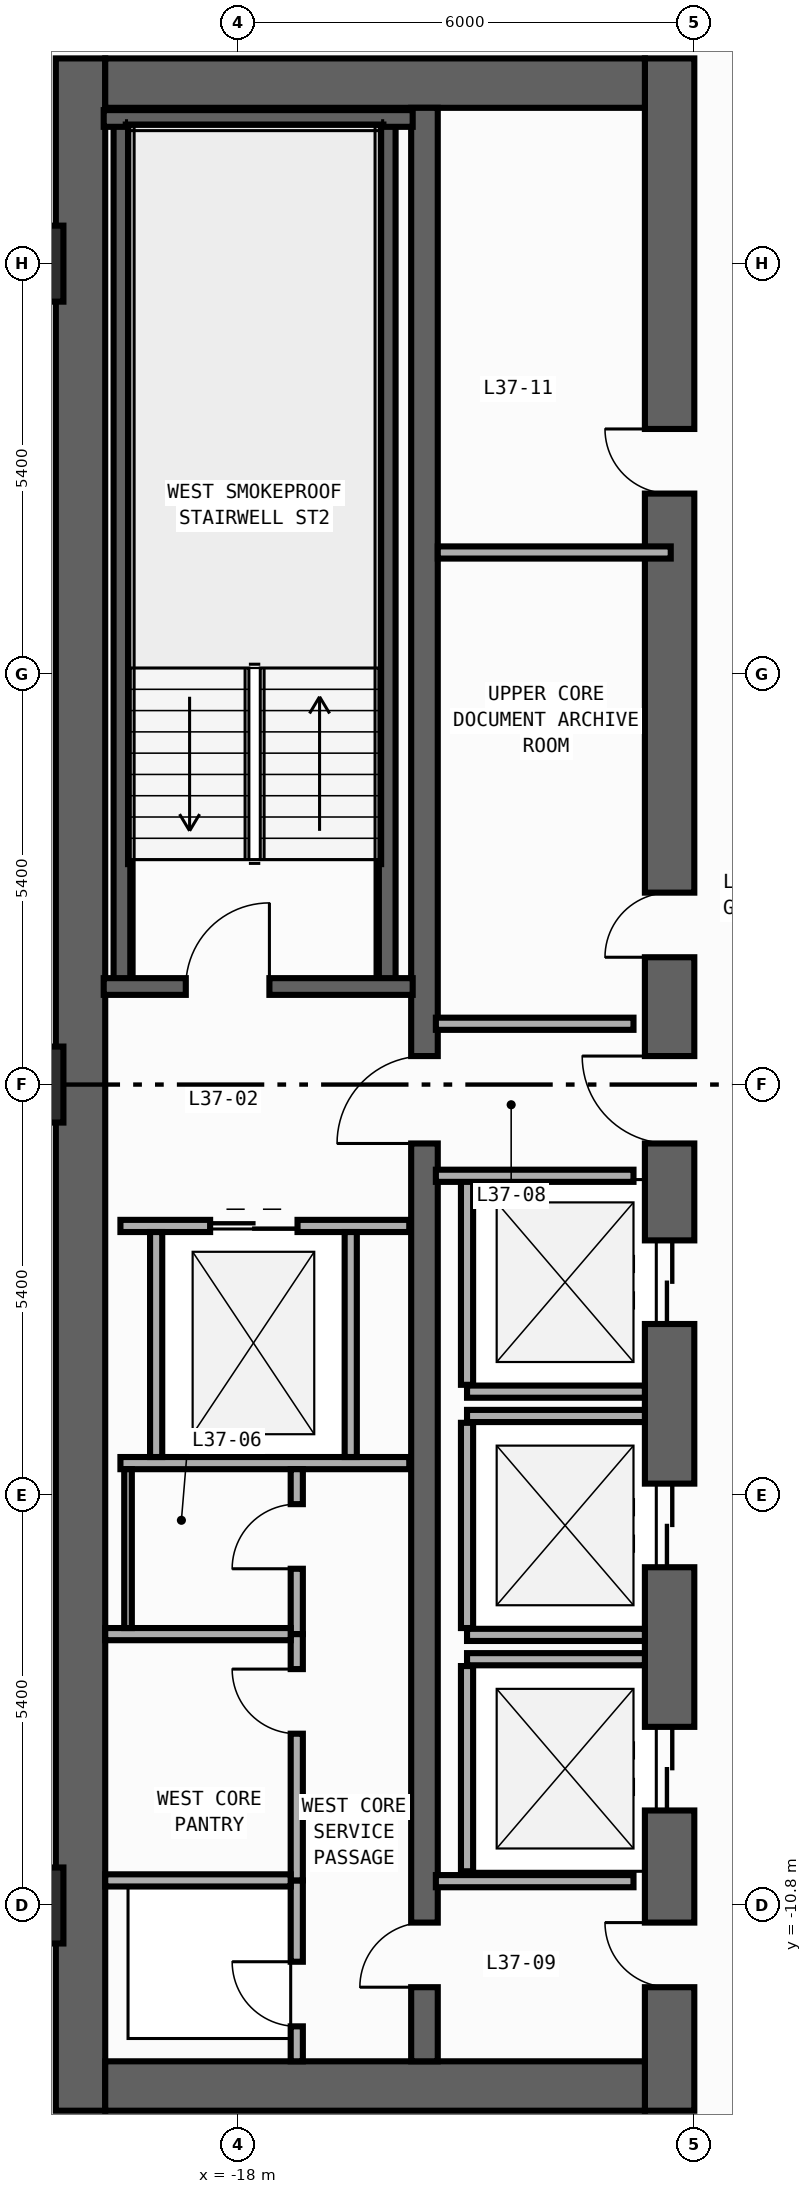
"""IFC4 building model, lengths in metres.
Left out: names, types, materials, properties, quantities, classifications, styles, units other than length and angle.
Written with IfcOpenShell. Run it as: python <this file> out.ifc"""

import sys

from ifc_helpers import new_model, si_unit, direction, frame, frame_2d, origin, origin_2d, place, context, subcontext, project, spatial, rectangle, extrude, element, fill, save


model = new_model("IFC4")
c1 = context("Model", 3, precision=1e-05, world=origin(), true_north=direction((0.0, 1.0)))
c2 = subcontext(c1, "Body", "Model", "MODEL_VIEW")
j1 = project(units=[si_unit("LENGTHUNIT", "METRE"), si_unit("PLANEANGLEUNIT", "RADIAN")], contexts=[c1])
p1 = place(None, origin())
s1 = spatial("IfcSite", under=j1, at=p1, CompositionType="ELEMENT")
p2 = place(p1, origin())
s2 = spatial("IfcBuilding", under=s1, at=p2, CompositionType="ELEMENT")
p3 = place(p2, frame((0.0, 0.0, 165.0)))
s3 = spatial("IfcBuildingStorey", under=s2, at=p3, CompositionType="ELEMENT", Elevation=165.0)
p4 = place(p3, frame((-20.075, -13.5, 0.0), z_axis=(0.0, 0.0, 1.0), x_axis=(0.0, 1.0, 0.0)))
e1 = element("IfcWall", 1, at=p4, inside=s3, PredefinedType="SHEAR", context=c2, shape_type="SweptSolid", body=[
    extrude(rectangle(XDim=27.0, YDim=0.65, at=frame_2d((13.5, 0.0))), origin(), (0.0, 0.0, 1.0), 3.54),
])
p5 = place(p3, frame((-12.325, -13.5, 0.0), z_axis=(0.0, 0.0, 1.0), x_axis=(0.0, 1.0, 0.0)))
e2 = element("IfcWall", 2, at=p5, inside=s3, PredefinedType="SHEAR", context=c2, shape_type="SweptSolid", body=[
    extrude(rectangle(XDim=27.0, YDim=0.65, at=frame_2d((13.5, 0.0))), origin(), (0.0, 0.0, 1.0), 3.54),
])
p6 = place(p5, frame((10.35, 0.0, 0.0)))
e3 = element("IfcOpeningElement", 3, at=p6, cuts=e2, PredefinedType="OPENING", context=c2, shape_type="SweptSolid", body=[
    extrude(rectangle(XDim=1.1, YDim=2.2, at=frame_2d((0.55, 1.1))), frame((0.0, 0.335, 0.0), z_axis=(0.0, -1.0, 0.0), x_axis=(1.0, 0.0, 0.0)), (0.0, 0.0, 1.0), 0.67),
])
p7 = place(p5, frame((7.15, 0.0, 0.0)))
e4 = element("IfcOpeningElement", 4, at=p7, cuts=e2, PredefinedType="OPENING", context=c2, shape_type="SweptSolid", body=[
    extrude(rectangle(XDim=1.1, YDim=2.2, at=frame_2d((0.55, 1.1))), frame((0.0, 0.335, 0.0), z_axis=(0.0, -1.0, 0.0), x_axis=(1.0, 0.0, 0.0)), (0.0, 0.0, 1.0), 0.67),
])
p8 = place(p5, frame((3.95, 0.0, 0.0)))
e5 = element("IfcOpeningElement", 5, at=p8, cuts=e2, PredefinedType="OPENING", context=c2, shape_type="SweptSolid", body=[
    extrude(rectangle(XDim=1.1, YDim=2.2, at=frame_2d((0.55, 1.1))), frame((0.0, 0.335, 0.0), z_axis=(0.0, -1.0, 0.0), x_axis=(1.0, 0.0, 0.0)), (0.0, 0.0, 1.0), 0.67),
])
p9 = place(p5, frame((15.175, 0.0, 0.0)))
e6 = element("IfcOpeningElement", 6, at=p9, cuts=e2, PredefinedType="OPENING", context=c2, shape_type="SweptSolid", body=[
    extrude(rectangle(XDim=0.85, YDim=2.1, at=frame_2d((0.425, 1.05))), frame((0.0, 0.335, 0.0), z_axis=(0.0, -1.0, 0.0), x_axis=(1.0, 0.0, 0.0)), (0.0, 0.0, 1.0), 0.67),
])
p10 = place(p5, frame((21.275, 0.0, 0.0)))
e7 = element("IfcOpeningElement", 7, at=p10, cuts=e2, PredefinedType="OPENING", context=c2, shape_type="SweptSolid", body=[
    extrude(rectangle(XDim=0.85, YDim=2.1, at=frame_2d((0.425, 1.05))), frame((0.0, 0.335, 0.0), z_axis=(0.0, -1.0, 0.0), x_axis=(1.0, 0.0, 0.0)), (0.0, 0.0, 1.0), 0.67),
])
p11 = place(p5, frame((12.725, 0.0, 0.0)))
e8 = element("IfcOpeningElement", 8, at=p11, cuts=e2, PredefinedType="OPENING", context=c2, shape_type="SweptSolid", body=[
    extrude(rectangle(XDim=1.15, YDim=2.2, at=frame_2d((0.575, 1.1))), frame((0.0, 0.335, 0.0), z_axis=(0.0, -1.0, 0.0), x_axis=(1.0, 0.0, 0.0)), (0.0, 0.0, 1.0), 0.67),
])
p12 = place(p5, frame((1.625, 0.0, 0.0)))
e9 = element("IfcOpeningElement", 9, at=p12, cuts=e2, PredefinedType="OPENING", context=c2, shape_type="SweptSolid", body=[
    extrude(rectangle(XDim=0.85, YDim=2.1, at=frame_2d((0.425, 1.05))), frame((0.0, 0.335, 0.0), z_axis=(0.0, -1.0, 0.0), x_axis=(1.0, 0.0, 0.0)), (0.0, 0.0, 1.0), 0.67),
])
for number, where, z_axis, x_axis in (
    (10, (-19.75, -13.175, 0.0), (0.0, 0.0, 1.0), (1.0, 0.0, 0.0)),
    (11, (-19.75, 13.175, 0.0), (0.0, 0.0, 1.0), (1.0, 0.0, 0.0)),
):
    element("IfcWall", number, at=place(p3, frame(where, z_axis=z_axis, x_axis=x_axis)), inside=s3, PredefinedType="SHEAR", context=c2, shape_type="SweptSolid", body=[
        extrude(rectangle(XDim=7.1, YDim=0.65, at=frame_2d((3.55, 0.0))), origin(), (0.0, 0.0, 1.0), 3.54),
    ])
p13 = place(p3, frame((-15.55, -12.85, 0.0), z_axis=(0.0, 0.0, 1.0), x_axis=(0.0, 1.0, 0.0)))
e12 = element("IfcWall", 12, at=p13, inside=s3, PredefinedType="SHEAR", context=c2, shape_type="SweptSolid", body=[
    extrude(rectangle(XDim=25.7, YDim=0.35, at=frame_2d((12.85, 0.0))), origin(), (0.0, 0.0, 1.0), 3.54),
])
p14 = place(p13, frame((12.075, 0.0, 0.0)))
e13 = element("IfcOpeningElement", 13, at=p14, cuts=e12, PredefinedType="OPENING", context=c2, shape_type="SweptSolid", body=[
    extrude(rectangle(XDim=1.15, YDim=2.2, at=frame_2d((0.575, 1.1))), frame((0.0, 0.185, 0.0), z_axis=(0.0, -1.0, 0.0), x_axis=(1.0, 0.0, 0.0)), (0.0, 0.0, 1.0), 0.37),
])
p15 = place(p13, frame((0.975, 0.0, 0.0)))
e14 = element("IfcOpeningElement", 14, at=p15, cuts=e12, PredefinedType="OPENING", context=c2, shape_type="SweptSolid", body=[
    extrude(rectangle(XDim=0.85, YDim=2.1, at=frame_2d((0.425, 1.05))), frame((0.0, 0.185, 0.0), z_axis=(0.0, -1.0, 0.0), x_axis=(1.0, 0.0, 0.0)), (0.0, 0.0, 1.0), 0.37),
])
for number, where, z_axis, x_axis in (
    (15, (-16.04, 1.29, 0.0), (0.0, 0.0, 1.0), (0.0, 1.0, 0.0)),
    (16, (-19.53, 1.29, 0.0), (0.0, 0.0, 1.0), (0.0, 1.0, 0.0)),
):
    element("IfcWall", number, at=place(p3, frame(where, z_axis=z_axis, x_axis=x_axis)), inside=s3, PredefinedType="SHEAR", context=c2, shape_type="SweptSolid", body=[
        extrude(rectangle(XDim=11.42, YDim=0.22, at=frame_2d((5.71, 0.0))), origin(), (0.0, 0.0, 1.0), 3.54),
    ])
p16 = place(p3, frame((-19.77, 12.71, 0.0), z_axis=(0.0, 0.0, 1.0), x_axis=(1.0, 0.0, 0.0)))
e17 = element("IfcWall", 17, at=p16, inside=s3, PredefinedType="SHEAR", context=c2, shape_type="SweptSolid", body=[
    extrude(rectangle(XDim=4.065, YDim=0.22, at=frame_2d((2.032, 0.0))), origin(), (0.0, 0.0, 1.0), 3.54),
])
p17 = place(p3, frame((-19.77, 1.29, 0.0), z_axis=(0.0, 0.0, 1.0), x_axis=(1.0, 0.0, 0.0)))
e18 = element("IfcWall", 18, at=p17, inside=s3, PredefinedType="SHEAR", context=c2, shape_type="SweptSolid", body=[
    extrude(rectangle(XDim=4.065, YDim=0.22, at=frame_2d((2.032, 0.0))), origin(), (0.0, 0.0, 1.0), 3.54),
])
p18 = place(p17, frame((1.08, 0.0, 0.0)))
e19 = element("IfcOpeningElement", 19, at=p18, cuts=e18, PredefinedType="OPENING", context=c2, shape_type="SweptSolid", body=[
    extrude(rectangle(XDim=1.1, YDim=2.2, at=frame_2d((0.55, 1.1))), frame((0.0, 0.12, 0.0), z_axis=(0.0, -1.0, 0.0), x_axis=(1.0, 0.0, 0.0)), (0.0, 0.0, 1.0), 0.24),
])
for number, where, z_axis, x_axis in (
    (20, (-20.8, -10.8, 0.0), (0.0, 0.0, 1.0), (1.0, 0.0, 0.0)),
    (21, (-20.8, 0.0, 0.0), (0.0, 0.0, 1.0), (1.0, 0.0, 0.0)),
    (22, (-20.8, 10.8, 0.0), (0.0, 0.0, 1.0), (1.0, 0.0, 0.0)),
):
    element("IfcColumn", number, at=place(p3, frame(where, z_axis=z_axis, x_axis=x_axis)), inside=s3, PredefinedType="COLUMN", context=c2, shape_type="SweptSolid", body=[
        extrude(rectangle(XDim=1.0, YDim=1.0, at=origin_2d()), origin(), (0.0, 0.0, 1.0), 3.8),
    ])
p19 = place(p3, frame((-14.99, -4.04, 0.0), z_axis=(0.0, 0.0, 1.0), x_axis=(1.0, 0.0, 0.0)))
e23 = element("IfcWall", 23, at=p19, inside=s3, PredefinedType="STANDARD", context=c2, shape_type="SweptSolid", body=[
    extrude(rectangle(XDim=2.34, YDim=0.16, at=frame_2d((1.17, 0.0))), origin(), (0.0, 0.0, 1.0), 3.54),
])
p20 = place(p3, frame((-14.99, -3.95, 0.0), z_axis=(0.0, 0.0, 1.0), x_axis=(0.0, 1.0, 0.0)))
e24 = element("IfcWall", 24, at=p20, inside=s3, PredefinedType="STANDARD", context=c2, shape_type="SweptSolid", body=[
    extrude(rectangle(XDim=2.7, YDim=0.16, at=frame_2d((1.35, 0.0))), origin(), (0.0, 0.0, 1.0), 3.54),
])
for number, where, z_axis, x_axis in (
    (25, (-14.99, -7.24, 0.0), (0.0, 0.0, 1.0), (1.0, 0.0, 0.0)),
    (26, (-14.99, -4.36, 0.0), (0.0, 0.0, 1.0), (1.0, 0.0, 0.0)),
):
    element("IfcWall", number, at=place(p3, frame(where, z_axis=z_axis, x_axis=x_axis)), inside=s3, PredefinedType="STANDARD", context=c2, shape_type="SweptSolid", body=[
        extrude(rectangle(XDim=2.34, YDim=0.16, at=frame_2d((1.17, 0.0))), origin(), (0.0, 0.0, 1.0), 3.54),
    ])
p21 = place(p3, frame((-14.99, -7.15, 0.0), z_axis=(0.0, 0.0, 1.0), x_axis=(0.0, 1.0, 0.0)))
e27 = element("IfcWall", 27, at=p21, inside=s3, PredefinedType="STANDARD", context=c2, shape_type="SweptSolid", body=[
    extrude(rectangle(XDim=2.7, YDim=0.16, at=frame_2d((1.35, 0.0))), origin(), (0.0, 0.0, 1.0), 3.54),
])
p22 = place(p3, frame((-14.99, -7.56, 0.0), z_axis=(0.0, 0.0, 1.0), x_axis=(1.0, 0.0, 0.0)))
e28 = element("IfcWall", 28, at=p22, inside=s3, PredefinedType="STANDARD", context=c2, shape_type="SweptSolid", body=[
    extrude(rectangle(XDim=2.34, YDim=0.16, at=frame_2d((1.17, 0.0))), origin(), (0.0, 0.0, 1.0), 3.54),
])
p23 = place(p3, frame((-14.99, -10.35, 0.0), z_axis=(0.0, 0.0, 1.0), x_axis=(0.0, 1.0, 0.0)))
e29 = element("IfcWall", 29, at=p23, inside=s3, PredefinedType="STANDARD", context=c2, shape_type="SweptSolid", body=[
    extrude(rectangle(XDim=2.7, YDim=0.16, at=frame_2d((1.35, 0.0))), origin(), (0.0, 0.0, 1.0), 3.54),
])
p24 = place(p3, frame((-19.55, -1.86, 0.0), z_axis=(0.0, 0.0, 1.0), x_axis=(1.0, 0.0, 0.0)))
e30 = element("IfcWall", 30, at=p24, inside=s3, PredefinedType="STANDARD", context=c2, shape_type="SweptSolid", body=[
    extrude(rectangle(XDim=3.8, YDim=0.16, at=frame_2d((1.9, 0.0))), origin(), (0.0, 0.0, 1.0), 3.54),
])
p25 = place(p24, frame((1.18, 0.0, 0.0)))
e31 = element("IfcOpeningElement", 31, at=p25, cuts=e30, PredefinedType="OPENING", context=c2, shape_type="SweptSolid", body=[
    extrude(rectangle(XDim=1.15, YDim=2.2, at=frame_2d((0.575, 1.1))), frame((0.0, 0.09, 0.0), z_axis=(0.0, -1.0, 0.0), x_axis=(1.0, 0.0, 0.0)), (0.0, 0.0, 1.0), 0.18),
])
p26 = place(p3, frame((-19.55, -4.98, 0.0), z_axis=(0.0, 0.0, 1.0), x_axis=(1.0, 0.0, 0.0)))
e32 = element("IfcWall", 32, at=p26, inside=s3, PredefinedType="STANDARD", context=c2, shape_type="SweptSolid", body=[
    extrude(rectangle(XDim=3.8, YDim=0.16, at=frame_2d((1.9, 0.0))), origin(), (0.0, 0.0, 1.0), 3.54),
])
for number, where, z_axis, x_axis in (
    (33, (-19.08, -4.9, 0.0), (0.0, 0.0, 1.0), (0.0, 1.0, 0.0)),
    (34, (-16.52, -4.9, 0.0), (0.0, 0.0, 1.0), (0.0, 1.0, 0.0)),
):
    element("IfcWall", number, at=place(p3, frame(where, z_axis=z_axis, x_axis=x_axis)), inside=s3, PredefinedType="STANDARD", context=c2, shape_type="SweptSolid", body=[
        extrude(rectangle(XDim=2.96, YDim=0.16, at=frame_2d((1.48, 0.0))), origin(), (0.0, 0.0, 1.0), 3.54),
    ])
for number, where, z_axis, x_axis in (
    (35, (-15.4, 0.8, 0.0), (0.0, 0.0, 1.0), (1.0, 0.0, 0.0)),
    (36, (-15.4, -1.2, 0.0), (0.0, 0.0, 1.0), (1.0, 0.0, 0.0)),
    (37, (-15.4, -10.48, 0.0), (0.0, 0.0, 1.0), (1.0, 0.0, 0.0)),
):
    element("IfcWall", number, at=place(p3, frame(where, z_axis=z_axis, x_axis=x_axis)), inside=s3, PredefinedType="STANDARD", context=c2, shape_type="SweptSolid", body=[
        extrude(rectangle(XDim=2.6, YDim=0.16, at=frame_2d((1.3, 0.0))), origin(), (0.0, 0.0, 1.0), 3.54),
    ])
p27 = place(p3, frame((-17.23, -12.85, 0.0), z_axis=(0.0, 0.0, 1.0), x_axis=(0.0, 1.0, 0.0)))
e38 = element("IfcWall", 38, at=p27, inside=s3, PredefinedType="PARTITIONING", context=c2, shape_type="SweptSolid", body=[
    extrude(rectangle(XDim=2.38, YDim=0.16, at=frame_2d((1.19, 0.0))), origin(), (0.0, 0.0, 1.0), 3.54),
])
p28 = place(p27, frame((0.46, 0.0, 0.0)))
e39 = element("IfcOpeningElement", 39, at=p28, cuts=e38, PredefinedType="OPENING", context=c2, shape_type="SweptSolid", body=[
    extrude(rectangle(XDim=0.85, YDim=2.1, at=frame_2d((0.425, 1.05))), frame((0.0, 0.09, 0.0), z_axis=(0.0, -1.0, 0.0), x_axis=(1.0, 0.0, 0.0)), (0.0, 0.0, 1.0), 0.18),
])
p29 = place(p3, frame((-17.23, -7.23, 0.0), z_axis=(0.0, 0.0, 1.0), x_axis=(0.0, 1.0, 0.0)))
e40 = element("IfcWall", 40, at=p29, inside=s3, PredefinedType="PARTITIONING", context=c2, shape_type="SweptSolid", body=[
    extrude(rectangle(XDim=2.17, YDim=0.16, at=frame_2d((1.085, 0.0))), origin(), (0.0, 0.0, 1.0), 3.54),
])
p30 = place(p29, frame((0.86, 0.0, 0.0)))
e41 = element("IfcOpeningElement", 41, at=p30, cuts=e40, PredefinedType="OPENING", context=c2, shape_type="SweptSolid", body=[
    extrude(rectangle(XDim=0.85, YDim=2.1, at=frame_2d((0.425, 1.05))), frame((0.0, 0.09, 0.0), z_axis=(0.0, -1.0, 0.0), x_axis=(1.0, 0.0, 0.0)), (0.0, 0.0, 1.0), 0.18),
])
p31 = place(p3, frame((-17.23, -10.47, 0.0), z_axis=(0.0, 0.0, 1.0), x_axis=(0.0, 1.0, 0.0)))
e42 = element("IfcWall", 42, at=p31, inside=s3, PredefinedType="PARTITIONING", context=c2, shape_type="SweptSolid", body=[
    extrude(rectangle(XDim=3.24, YDim=0.16, at=frame_2d((1.62, 0.0))), origin(), (0.0, 0.0, 1.0), 3.54),
])
p32 = place(p31, frame((1.93, 0.0, 0.0)))
e43 = element("IfcOpeningElement", 43, at=p32, cuts=e42, PredefinedType="OPENING", context=c2, shape_type="SweptSolid", body=[
    extrude(rectangle(XDim=0.85, YDim=2.1, at=frame_2d((0.425, 1.05))), frame((0.0, 0.09, 0.0), z_axis=(0.0, -1.0, 0.0), x_axis=(1.0, 0.0, 0.0)), (0.0, 0.0, 1.0), 0.18),
])
for number, where, z_axis, x_axis in (
    (44, (-19.75, -10.47, 0.0), (0.0, 0.0, 1.0), (1.0, 0.0, 0.0)),
    (45, (-19.75, -7.23, 0.0), (0.0, 0.0, 1.0), (1.0, 0.0, 0.0)),
):
    element("IfcWall", number, at=place(p3, frame(where, z_axis=z_axis, x_axis=x_axis)), inside=s3, PredefinedType="PARTITIONING", context=c2, shape_type="SweptSolid", body=[
        extrude(rectangle(XDim=2.44, YDim=0.16, at=frame_2d((1.22, 0.0))), origin(), (0.0, 0.0, 1.0), 3.54),
    ])
p33 = place(p3, frame((-15.375, 7.0, 0.0), z_axis=(0.0, 0.0, 1.0), x_axis=(1.0, 0.0, 0.0)))
e46 = element("IfcWall", 46, at=p33, inside=s3, PredefinedType="PARTITIONING", context=c2, shape_type="SweptSolid", body=[
    extrude(rectangle(XDim=3.065, YDim=0.16, at=frame_2d((1.532, 0.0))), origin(), (0.0, 0.0, 1.0), 3.54),
])
p34 = place(p3, frame((-19.45, -7.15, 0.0), z_axis=(0.0, 0.0, 1.0), x_axis=(0.0, 1.0, 0.0)))
e47 = element("IfcWall", 47, at=p34, inside=s3, PredefinedType="PARTITIONING", context=c2, shape_type="SweptSolid", body=[
    extrude(rectangle(XDim=2.09, YDim=0.1, at=frame_2d((1.045, 0.0))), origin(), (0.0, 0.0, 1.0), 3.54),
])
p35 = place(p18, origin())
e48 = element("IfcDoor", 48, at=p35, inside=s3, OperationType="SINGLE_SWING_RIGHT", PredefinedType="DOOR", context=c2, shape_type="SweptSolid", body=[
    extrude(rectangle(XDim=1.1, YDim=2.2, at=frame_2d((0.55, 1.1))), frame((0.0, 0.025, 0.0), z_axis=(0.0, -1.0, 0.0), x_axis=(1.0, 0.0, 0.0)), (0.0, 0.0, 1.0), 0.05),
])
fill(e19, e48)
p36 = place(p6, origin())
e49 = element("IfcDoor", 49, at=p36, inside=s3, OperationType="DOUBLE_DOOR_SLIDING", PredefinedType="DOOR", context=c2, shape_type="SweptSolid", body=[
    extrude(rectangle(XDim=1.1, YDim=2.2, at=frame_2d((0.55, 1.1))), frame((0.0, 0.025, 0.0), z_axis=(0.0, -1.0, 0.0), x_axis=(1.0, 0.0, 0.0)), (0.0, 0.0, 1.0), 0.05),
])
fill(e3, e49)
p37 = place(p7, origin())
e50 = element("IfcDoor", 50, at=p37, inside=s3, OperationType="DOUBLE_DOOR_SLIDING", PredefinedType="DOOR", context=c2, shape_type="SweptSolid", body=[
    extrude(rectangle(XDim=1.1, YDim=2.2, at=frame_2d((0.55, 1.1))), frame((0.0, 0.025, 0.0), z_axis=(0.0, -1.0, 0.0), x_axis=(1.0, 0.0, 0.0)), (0.0, 0.0, 1.0), 0.05),
])
fill(e4, e50)
p38 = place(p8, origin())
e51 = element("IfcDoor", 51, at=p38, inside=s3, OperationType="DOUBLE_DOOR_SLIDING", PredefinedType="DOOR", context=c2, shape_type="SweptSolid", body=[
    extrude(rectangle(XDim=1.1, YDim=2.2, at=frame_2d((0.55, 1.1))), frame((0.0, 0.025, 0.0), z_axis=(0.0, -1.0, 0.0), x_axis=(1.0, 0.0, 0.0)), (0.0, 0.0, 1.0), 0.05),
])
fill(e5, e51)
p39 = place(p9, origin())
e52 = element("IfcDoor", 52, at=p39, inside=s3, OperationType="SINGLE_SWING_LEFT", PredefinedType="DOOR", context=c2, shape_type="SweptSolid", body=[
    extrude(rectangle(XDim=0.85, YDim=2.1, at=frame_2d((0.425, 1.05))), frame((0.0, 0.025, 0.0), z_axis=(0.0, -1.0, 0.0), x_axis=(1.0, 0.0, 0.0)), (0.0, 0.0, 1.0), 0.05),
])
fill(e6, e52)
p40 = place(p10, origin())
e53 = element("IfcDoor", 53, at=p40, inside=s3, OperationType="SINGLE_SWING_RIGHT", PredefinedType="DOOR", context=c2, shape_type="SweptSolid", body=[
    extrude(rectangle(XDim=0.85, YDim=2.1, at=frame_2d((0.425, 1.05))), frame((0.0, 0.025, 0.0), z_axis=(0.0, -1.0, 0.0), x_axis=(1.0, 0.0, 0.0)), (0.0, 0.0, 1.0), 0.05),
])
fill(e7, e53)
p41 = place(p11, origin())
e54 = element("IfcDoor", 54, at=p41, inside=s3, OperationType="SINGLE_SWING_RIGHT", PredefinedType="DOOR", context=c2, shape_type="SweptSolid", body=[
    extrude(rectangle(XDim=1.15, YDim=2.2, at=frame_2d((0.575, 1.1))), frame((0.0, 0.025, 0.0), z_axis=(0.0, -1.0, 0.0), x_axis=(1.0, 0.0, 0.0)), (0.0, 0.0, 1.0), 0.05),
])
fill(e8, e54)
p42 = place(p14, origin())
e55 = element("IfcDoor", 55, at=p42, inside=s3, OperationType="SINGLE_SWING_LEFT", PredefinedType="DOOR", context=c2, shape_type="SweptSolid", body=[
    extrude(rectangle(XDim=1.15, YDim=2.2, at=frame_2d((0.575, 1.1))), frame((0.0, 0.025, 0.0), z_axis=(0.0, -1.0, 0.0), x_axis=(1.0, 0.0, 0.0)), (0.0, 0.0, 1.0), 0.05),
])
fill(e13, e55)
p43 = place(p12, origin())
e56 = element("IfcDoor", 56, at=p43, inside=s3, OperationType="SINGLE_SWING_RIGHT", PredefinedType="DOOR", context=c2, shape_type="SweptSolid", body=[
    extrude(rectangle(XDim=0.85, YDim=2.1, at=frame_2d((0.425, 1.05))), frame((0.0, 0.025, 0.0), z_axis=(0.0, -1.0, 0.0), x_axis=(1.0, 0.0, 0.0)), (0.0, 0.0, 1.0), 0.05),
])
fill(e9, e56)
p44 = place(p15, origin())
e57 = element("IfcDoor", 57, at=p44, inside=s3, OperationType="SINGLE_SWING_LEFT", PredefinedType="DOOR", context=c2, shape_type="SweptSolid", body=[
    extrude(rectangle(XDim=0.85, YDim=2.1, at=frame_2d((0.425, 1.05))), frame((0.0, 0.025, 0.0), z_axis=(0.0, -1.0, 0.0), x_axis=(1.0, 0.0, 0.0)), (0.0, 0.0, 1.0), 0.05),
])
fill(e14, e57)
p45 = place(p25, origin())
e58 = element("IfcDoor", 58, at=p45, inside=s3, OperationType="DOUBLE_DOOR_SLIDING", PredefinedType="DOOR", context=c2, shape_type="SweptSolid", body=[
    extrude(rectangle(XDim=1.15, YDim=2.2, at=frame_2d((0.575, 1.1))), frame((0.0, 0.025, 0.0), z_axis=(0.0, -1.0, 0.0), x_axis=(1.0, 0.0, 0.0)), (0.0, 0.0, 1.0), 0.05),
])
fill(e31, e58)
p46 = place(p28, origin())
e59 = element("IfcDoor", 59, at=p46, inside=s3, OperationType="SINGLE_SWING_RIGHT", PredefinedType="DOOR", context=c2, shape_type="SweptSolid", body=[
    extrude(rectangle(XDim=0.85, YDim=2.1, at=frame_2d((0.425, 1.05))), frame((0.0, 0.025, 0.0), z_axis=(0.0, -1.0, 0.0), x_axis=(1.0, 0.0, 0.0)), (0.0, 0.0, 1.0), 0.05),
])
fill(e39, e59)
p47 = place(p30, origin())
e60 = element("IfcDoor", 60, at=p47, inside=s3, OperationType="SINGLE_SWING_LEFT", PredefinedType="DOOR", context=c2, shape_type="SweptSolid", body=[
    extrude(rectangle(XDim=0.85, YDim=2.1, at=frame_2d((0.425, 1.05))), frame((0.0, 0.025, 0.0), z_axis=(0.0, -1.0, 0.0), x_axis=(1.0, 0.0, 0.0)), (0.0, 0.0, 1.0), 0.05),
])
fill(e41, e60)
p48 = place(p32, origin())
e61 = element("IfcDoor", 61, at=p48, inside=s3, OperationType="SINGLE_SWING_RIGHT", PredefinedType="DOOR", context=c2, shape_type="SweptSolid", body=[
    extrude(rectangle(XDim=0.85, YDim=2.1, at=frame_2d((0.425, 1.05))), frame((0.0, 0.025, 0.0), z_axis=(0.0, -1.0, 0.0), x_axis=(1.0, 0.0, 0.0)), (0.0, 0.0, 1.0), 0.05),
])
fill(e43, e61)
save(model, sys.argv[1])
